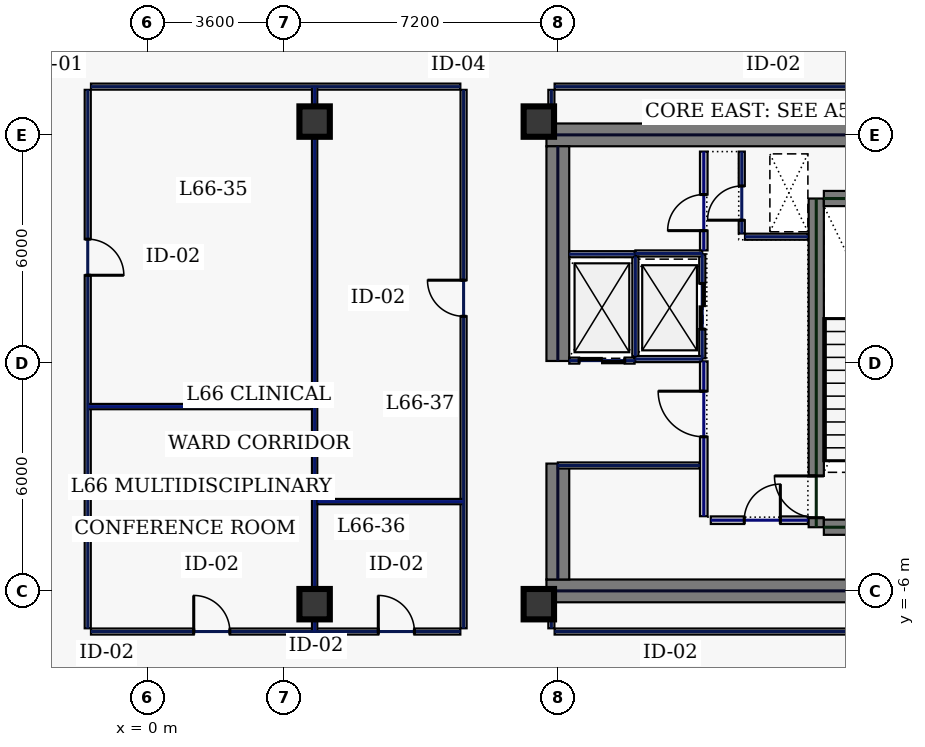
"""IFC4 building model, lengths in metres.
Left out: names, types, materials, properties, quantities, classifications, styles, units other than length and angle.
Written with IfcOpenShell. Run it as: python <this file> out.ifc"""

import sys

from ifc_helpers import new_model, si_unit, direction, frame, frame_2d, origin, origin_2d, place, context, subcontext, project, spatial, rectangle, hollow_rectangle, extrude, element, fill, save


model = new_model("IFC4")
c1 = context("Model", 3, precision=1e-05, world=origin(), true_north=direction((0.0, 1.0)))
c2 = subcontext(c1, "Body", "Model", "MODEL_VIEW")
j1 = project(units=[si_unit("LENGTHUNIT", "METRE"), si_unit("PLANEANGLEUNIT", "RADIAN")], contexts=[c1])
p1 = place(None, origin())
s1 = spatial("IfcSite", under=j1, at=p1, CompositionType="ELEMENT")
p2 = place(p1, origin())
s2 = spatial("IfcBuilding", under=s1, at=p2, CompositionType="ELEMENT")
p3 = place(p2, frame((0.0, 0.0, 285.0)))
s3 = spatial("IfcBuildingStorey", under=s2, at=p3, CompositionType="ELEMENT", Elevation=285.0)
for number, where, z_axis, x_axis in (
    (1, (10.5, 6.0, 0.0), (0.0, 0.0, 1.0), (1.0, 0.0, 0.0)),
    (2, (10.5, -6.0, 0.0), (0.0, 0.0, 1.0), (1.0, 0.0, 0.0)),
):
    element("IfcWall", number, at=place(p3, frame(where, z_axis=z_axis, x_axis=x_axis)), inside=s3, PredefinedType="SHEAR", context=c2, shape_type="SweptSolid", body=[
        extrude(rectangle(XDim=11.5, YDim=0.6, at=frame_2d((5.75, 0.0))), origin(), (0.0, 0.0, 1.0), 3.74),
    ])
p4 = place(p3, frame((10.8, -5.7, 0.0), z_axis=(0.0, 0.0, 1.0), x_axis=(0.0, 1.0, 0.0)))
e3 = element("IfcWall", 3, at=p4, inside=s3, PredefinedType="SHEAR", context=c2, shape_type="SweptSolid", body=[
    extrude(rectangle(XDim=3.05, YDim=0.6, at=frame_2d((1.525, 0.0))), origin(), (0.0, 0.0, 1.0), 3.74),
])
p5 = place(p3, frame((10.8, 0.05, 0.0), z_axis=(0.0, 0.0, 1.0), x_axis=(0.0, 1.0, 0.0)))
e4 = element("IfcWall", 4, at=p5, inside=s3, PredefinedType="SHEAR", context=c2, shape_type="SweptSolid", body=[
    extrude(rectangle(XDim=5.65, YDim=0.6, at=frame_2d((2.825, 0.0))), origin(), (0.0, 0.0, 1.0), 3.74),
])
p6 = place(p3, frame((17.6, -4.325, 0.0), z_axis=(0.0, 0.0, 1.0), x_axis=(0.0, 1.0, 0.0)))
e5 = element("IfcWall", 5, at=p6, inside=s3, PredefinedType="SHEAR", context=c2, shape_type="SweptSolid", body=[
    extrude(rectangle(XDim=8.65, YDim=0.4, at=frame_2d((4.325, 0.0))), origin(), (0.0, 0.0, 1.0), 3.74),
])
p7 = place(p6, frame((0.25, 0.0, 0.0)))
e6 = element("IfcOpeningElement", 6, at=p7, cuts=e5, PredefinedType="OPENING", context=c2, shape_type="SweptSolid", body=[
    extrude(rectangle(XDim=1.1, YDim=2.2, at=frame_2d((0.55, 1.1))), frame((0.0, 0.21, 0.0), z_axis=(0.0, -1.0, 0.0), x_axis=(1.0, 0.0, 0.0)), (0.0, 0.0, 1.0), 0.42),
])
for number, where, z_axis, x_axis in (
    (7, (17.8, -4.325, 0.0), (0.0, 0.0, 1.0), (1.0, 0.0, 0.0)),
    (8, (17.8, 4.325, 0.0), (0.0, 0.0, 1.0), (1.0, 0.0, 0.0)),
):
    element("IfcWall", number, at=place(p3, frame(where, z_axis=z_axis, x_axis=x_axis)), inside=s3, PredefinedType="SHEAR", context=c2, shape_type="SweptSolid", body=[
        extrude(rectangle(XDim=3.4, YDim=0.4, at=frame_2d((1.7, 0.0))), origin(), (0.0, 0.0, 1.0), 3.74),
    ])
for number, where, z_axis, x_axis in (
    (9, (10.3, -6.35, 0.0), (0.0, 0.0, 1.0), (1.0, 0.0, 0.0)),
    (10, (10.3, 6.35, 0.0), (0.0, 0.0, 1.0), (1.0, 0.0, 0.0)),
    (11, (4.4, -6.35, 0.0), (0.0, 0.0, 1.0), (1.0, 0.0, 0.0)),
    (12, (4.4, 6.35, 0.0), (0.0, 0.0, 1.0), (1.0, 0.0, 0.0)),
):
    element("IfcColumn", number, at=place(p3, frame(where, z_axis=z_axis, x_axis=x_axis)), inside=s3, PredefinedType="COLUMN", context=c2, shape_type="SweptSolid", body=[
        extrude(hollow_rectangle(XDim=0.8, YDim=0.8, WallThickness=0.036, at=origin_2d()), origin(), (0.0, 0.0, 1.0), 3.74),
    ])
p8 = place(p3, frame((14.6, 0.12, 0.0), z_axis=(0.0, 0.0, 1.0), x_axis=(0.0, 1.0, 0.0)))
e13 = element("IfcWall", 13, at=p8, inside=s3, PredefinedType="PARTITIONING", context=c2, shape_type="SweptSolid", body=[
    extrude(rectangle(XDim=2.74, YDim=0.16, at=frame_2d((1.37, 0.0))), origin(), (0.0, 0.0, 1.0), 3.74),
])
p9 = place(p8, frame((0.77, 0.0, 0.0)))
e14 = element("IfcOpeningElement", 14, at=p9, cuts=e13, PredefinedType="OPENING", context=c2, shape_type="SweptSolid", body=[
    extrude(rectangle(XDim=1.2, YDim=2.2, at=frame_2d((0.6, 1.1))), frame((0.0, 0.09, 0.0), z_axis=(0.0, -1.0, 0.0), x_axis=(1.0, 0.0, 0.0)), (0.0, 0.0, 1.0), 0.18),
])
for number, where, z_axis, x_axis in (
    (15, (12.84, 0.1, 0.0), (0.0, 0.0, 1.0), (1.0, 0.0, 0.0)),
    (16, (12.84, 2.88, 0.0), (0.0, 0.0, 1.0), (1.0, 0.0, 0.0)),
):
    element("IfcWall", number, at=place(p3, frame(where, z_axis=z_axis, x_axis=x_axis)), inside=s3, PredefinedType="PARTITIONING", context=c2, shape_type="SweptSolid", body=[
        extrude(rectangle(XDim=1.76, YDim=0.16, at=frame_2d((0.88, 0.0))), origin(), (0.0, 0.0, 1.0), 3.74),
    ])
p10 = place(p3, frame((12.84, 0.18, 0.0), z_axis=(0.0, 0.0, 1.0), x_axis=(0.0, 1.0, 0.0)))
e17 = element("IfcWall", 17, at=p10, inside=s3, PredefinedType="PARTITIONING", context=c2, shape_type="SweptSolid", body=[
    extrude(rectangle(XDim=2.62, YDim=0.16, at=frame_2d((1.31, 0.0))), origin(), (0.0, 0.0, 1.0), 3.74),
])
p11 = place(p3, frame((11.1, 0.06, 0.0), z_axis=(0.0, 0.0, 1.0), x_axis=(1.0, 0.0, 0.0)))
e18 = element("IfcWall", 18, at=p11, inside=s3, PredefinedType="PARTITIONING", context=c2, shape_type="SweptSolid", body=[
    extrude(rectangle(XDim=1.72, YDim=0.16, at=frame_2d((0.86, 0.0))), origin(), (0.0, 0.0, 1.0), 3.74),
])
p12 = place(p11, frame((0.26, 0.0, 0.0)))
e19 = element("IfcOpeningElement", 19, at=p12, cuts=e18, PredefinedType="OPENING", context=c2, shape_type="SweptSolid", body=[
    extrude(rectangle(XDim=1.2, YDim=2.2, at=frame_2d((0.6, 1.1))), frame((0.0, 0.09, 0.0), z_axis=(0.0, -1.0, 0.0), x_axis=(1.0, 0.0, 0.0)), (0.0, 0.0, 1.0), 0.18),
])
p13 = place(p3, frame((11.1, 2.86, 0.0), z_axis=(0.0, 0.0, 1.0), x_axis=(1.0, 0.0, 0.0)))
e20 = element("IfcWall", 20, at=p13, inside=s3, PredefinedType="PARTITIONING", context=c2, shape_type="SweptSolid", body=[
    extrude(rectangle(XDim=1.72, YDim=0.16, at=frame_2d((0.86, 0.0))), origin(), (0.0, 0.0, 1.0), 3.74),
])
p14 = place(p3, frame((15.64, 3.405, 0.0), z_axis=(0.0, 0.0, 1.0), x_axis=(0.0, 1.0, 0.0)))
e21 = element("IfcWall", 21, at=p14, inside=s3, PredefinedType="PARTITIONING", context=c2, shape_type="SweptSolid", body=[
    extrude(rectangle(XDim=2.155, YDim=0.16, at=frame_2d((1.078, 0.0))), origin(), (0.0, 0.0, 1.0), 3.74),
])
p15 = place(p14, frame((0.35, 0.0, 0.0)))
e22 = element("IfcOpeningElement", 22, at=p15, cuts=e21, PredefinedType="OPENING", context=c2, shape_type="SweptSolid", body=[
    extrude(rectangle(XDim=0.9, YDim=2.2, at=frame_2d((0.45, 1.1))), frame((0.0, 0.09, 0.0), z_axis=(0.0, -1.0, 0.0), x_axis=(1.0, 0.0, 0.0)), (0.0, 0.0, 1.0), 0.18),
])
p16 = place(p3, frame((15.725, 3.32, 0.0), z_axis=(0.0, 0.0, 1.0), x_axis=(1.0, 0.0, 0.0)))
e23 = element("IfcWall", 23, at=p16, inside=s3, PredefinedType="PARTITIONING", context=c2, shape_type="SweptSolid", body=[
    extrude(rectangle(XDim=1.655, YDim=0.16, at=frame_2d((0.827, 0.0))), origin(), (0.0, 0.0, 1.0), 3.74),
])
p17 = place(p3, frame((14.825, -4.14, 0.0), z_axis=(0.0, 0.0, 1.0), x_axis=(1.0, 0.0, 0.0)))
e24 = element("IfcWall", 24, at=p17, inside=s3, PredefinedType="SOLIDWALL", context=c2, shape_type="SweptSolid", body=[
    extrude(rectangle(XDim=2.555, YDim=0.2, at=frame_2d((1.277, 0.0))), origin(), (0.0, 0.0, 1.0), 3.74),
])
p18 = place(p17, frame((0.88, 0.0, 0.0)))
e25 = element("IfcOpeningElement", 25, at=p18, cuts=e24, PredefinedType="OPENING", context=c2, shape_type="SweptSolid", body=[
    extrude(rectangle(XDim=0.95, YDim=2.2, at=frame_2d((0.475, 1.1))), frame((0.0, 0.11, 0.0), z_axis=(0.0, -1.0, 0.0), x_axis=(1.0, 0.0, 0.0)), (0.0, 0.0, 1.0), 0.22),
])
p19 = place(p3, frame((10.8, -2.7, 0.0), z_axis=(0.0, 0.0, 1.0), x_axis=(1.0, 0.0, 0.0)))
e26 = element("IfcWall", 26, at=p19, inside=s3, PredefinedType="PARTITIONING", context=c2, shape_type="SweptSolid", body=[
    extrude(rectangle(XDim=3.735, YDim=0.16, at=frame_2d((1.867, 0.0))), origin(), (0.0, 0.0, 1.0), 3.74),
])
p20 = place(p3, frame((14.64, 2.96, 0.0), z_axis=(0.0, 0.0, 1.0), x_axis=(0.0, 1.0, 0.0)))
e27 = element("IfcWall", 27, at=p20, inside=s3, PredefinedType="SOLIDWALL", context=c2, shape_type="SweptSolid", body=[
    extrude(rectangle(XDim=2.6, YDim=0.2, at=frame_2d((1.3, 0.0))), origin(), (0.0, 0.0, 1.0), 3.74),
])
p21 = place(p20, frame((0.52, 0.0, 0.0)))
e28 = element("IfcOpeningElement", 28, at=p21, cuts=e27, PredefinedType="OPENING", context=c2, shape_type="SweptSolid", body=[
    extrude(rectangle(XDim=0.95, YDim=2.2, at=frame_2d((0.475, 1.1))), frame((0.0, 0.11, 0.0), z_axis=(0.0, -1.0, 0.0), x_axis=(1.0, 0.0, 0.0)), (0.0, 0.0, 1.0), 0.22),
])
p22 = place(p3, frame((14.64, -4.035, 0.0), z_axis=(0.0, 0.0, 1.0), x_axis=(0.0, 1.0, 0.0)))
e29 = element("IfcWall", 29, at=p22, inside=s3, PredefinedType="SOLIDWALL", context=c2, shape_type="SweptSolid", body=[
    extrude(rectangle(XDim=4.075, YDim=0.2, at=frame_2d((2.038, 0.0))), origin(), (0.0, 0.0, 1.0), 3.74),
])
p23 = place(p22, frame((2.09, 0.0, 0.0)))
e30 = element("IfcOpeningElement", 30, at=p23, cuts=e29, PredefinedType="OPENING", context=c2, shape_type="SweptSolid", body=[
    extrude(rectangle(XDim=1.2, YDim=2.2, at=frame_2d((0.6, 1.1))), frame((0.0, 0.11, 0.0), z_axis=(0.0, -1.0, 0.0), x_axis=(1.0, 0.0, 0.0)), (0.0, 0.0, 1.0), 0.22),
])
p24 = place(p3, frame((21.915, 7.27, 0.0), z_axis=(0.0, 0.0, 1.0), x_axis=(-1.0, 0.0, 0.0)))
e31 = element("IfcWall", 31, at=p24, inside=s3, PredefinedType="PARTITIONING", context=c2, shape_type="SweptSolid", body=[
    extrude(rectangle(XDim=11.2, YDim=0.16, at=frame_2d((5.6, 0.0))), origin(), (0.0, 0.0, 1.0), 3.74),
])
p25 = place(p3, frame((10.63, 7.185, 0.0), z_axis=(0.0, 0.0, 1.0), x_axis=(0.0, -1.0, 0.0)))
e32 = element("IfcWall", 32, at=p25, inside=s3, PredefinedType="PARTITIONING", context=c2, shape_type="SweptSolid", body=[
    extrude(rectangle(XDim=0.765, YDim=0.16, at=frame_2d((0.383, 0.0))), origin(), (0.0, 0.0, 1.0), 3.74),
])
p26 = place(p3, frame((10.63, -6.42, 0.0), z_axis=(0.0, 0.0, 1.0), x_axis=(0.0, -1.0, 0.0)))
e33 = element("IfcWall", 33, at=p26, inside=s3, PredefinedType="PARTITIONING", context=c2, shape_type="SweptSolid", body=[
    extrude(rectangle(XDim=0.565, YDim=0.16, at=frame_2d((0.283, 0.0))), origin(), (0.0, 0.0, 1.0), 3.74),
])
p27 = place(p3, frame((10.715, -7.07, 0.0), z_axis=(0.0, 0.0, 1.0), x_axis=(1.0, 0.0, 0.0)))
e34 = element("IfcWall", 34, at=p27, inside=s3, PredefinedType="PARTITIONING", context=c2, shape_type="SweptSolid", body=[
    extrude(rectangle(XDim=11.2, YDim=0.16, at=frame_2d((5.6, 0.0))), origin(), (0.0, 0.0, 1.0), 3.74),
])
p28 = place(p3, frame((8.235, 7.27, 0.0), z_axis=(0.0, 0.0, 1.0), x_axis=(-1.0, 0.0, 0.0)))
e35 = element("IfcWall", 35, at=p28, inside=s3, PredefinedType="PARTITIONING", context=c2, shape_type="SweptSolid", body=[
    extrude(rectangle(XDim=9.72, YDim=0.16, at=frame_2d((4.86, 0.0))), origin(), (0.0, 0.0, 1.0), 3.74),
])
p29 = place(p3, frame((-1.57, 7.185, 0.0), z_axis=(0.0, 0.0, 1.0), x_axis=(0.0, -1.0, 0.0)))
e36 = element("IfcWall", 36, at=p29, inside=s3, PredefinedType="PARTITIONING", context=c2, shape_type="SweptSolid", body=[
    extrude(rectangle(XDim=14.17, YDim=0.16, at=frame_2d((7.085, 0.0))), origin(), (0.0, 0.0, 1.0), 3.74),
])
p30 = place(p29, frame((3.929, 0.0, 0.0)))
e37 = element("IfcOpeningElement", 37, at=p30, cuts=e36, PredefinedType="OPENING", context=c2, shape_type="SweptSolid", body=[
    extrude(rectangle(XDim=0.95, YDim=2.2, at=frame_2d((0.475, 1.1))), frame((0.0, 0.09, 0.0), z_axis=(0.0, -1.0, 0.0), x_axis=(1.0, 0.0, 0.0)), (0.0, 0.0, 1.0), 0.18),
])
p31 = place(p3, frame((-1.485, -7.07, 0.0), z_axis=(0.0, 0.0, 1.0), x_axis=(1.0, 0.0, 0.0)))
e38 = element("IfcWall", 38, at=p31, inside=s3, PredefinedType="PARTITIONING", context=c2, shape_type="SweptSolid", body=[
    extrude(rectangle(XDim=9.72, YDim=0.16, at=frame_2d((4.86, 0.0))), origin(), (0.0, 0.0, 1.0), 3.74),
])
p32 = place(p31, frame((2.704, 0.0, 0.0)))
e39 = element("IfcOpeningElement", 39, at=p32, cuts=e38, PredefinedType="OPENING", context=c2, shape_type="SweptSolid", body=[
    extrude(rectangle(XDim=0.95, YDim=2.2, at=frame_2d((0.475, 1.1))), frame((0.0, 0.09, 0.0), z_axis=(0.0, -1.0, 0.0), x_axis=(1.0, 0.0, 0.0)), (0.0, 0.0, 1.0), 0.18),
])
p33 = place(p31, frame((7.561, 0.0, 0.0)))
e40 = element("IfcOpeningElement", 40, at=p33, cuts=e38, PredefinedType="OPENING", context=c2, shape_type="SweptSolid", body=[
    extrude(rectangle(XDim=0.95, YDim=2.2, at=frame_2d((0.475, 1.1))), frame((0.0, 0.09, 0.0), z_axis=(0.0, -1.0, 0.0), x_axis=(1.0, 0.0, 0.0)), (0.0, 0.0, 1.0), 0.18),
])
p34 = place(p3, frame((8.32, -6.985, 0.0), z_axis=(0.0, 0.0, 1.0), x_axis=(0.0, 1.0, 0.0)))
e41 = element("IfcWall", 41, at=p34, inside=s3, PredefinedType="PARTITIONING", context=c2, shape_type="SweptSolid", body=[
    extrude(rectangle(XDim=14.17, YDim=0.16, at=frame_2d((7.085, 0.0))), origin(), (0.0, 0.0, 1.0), 3.74),
])
p35 = place(p34, frame((8.211, 0.0, 0.0)))
e42 = element("IfcOpeningElement", 42, at=p35, cuts=e41, PredefinedType="OPENING", context=c2, shape_type="SweptSolid", body=[
    extrude(rectangle(XDim=0.95, YDim=2.2, at=frame_2d((0.475, 1.1))), frame((0.0, 0.09, 0.0), z_axis=(0.0, -1.0, 0.0), x_axis=(1.0, 0.0, 0.0)), (0.0, 0.0, 1.0), 0.18),
])
p36 = place(p3, frame((4.4, -7.065, 0.0), z_axis=(0.0, 0.0, 1.0), x_axis=(0.0, 1.0, 0.0)))
e43 = element("IfcWall", 43, at=p36, inside=s3, PredefinedType="PARTITIONING", context=c2, shape_type="SweptSolid", body=[
    extrude(rectangle(XDim=14.33, YDim=0.14, at=frame_2d((7.165, 0.0))), origin(), (0.0, 0.0, 1.0), 3.035),
])
p37 = place(p3, frame((-1.565, -1.15, 0.0), z_axis=(0.0, 0.0, 1.0), x_axis=(1.0, 0.0, 0.0)))
e44 = element("IfcWall", 44, at=p37, inside=s3, PredefinedType="PARTITIONING", context=c2, shape_type="SweptSolid", body=[
    extrude(rectangle(XDim=5.89, YDim=0.14, at=frame_2d((2.945, 0.0))), origin(), (0.0, 0.0, 1.0), 3.74),
])
p38 = place(p3, frame((4.475, -3.65, 0.0), z_axis=(0.0, 0.0, 1.0), x_axis=(1.0, 0.0, 0.0)))
e45 = element("IfcWall", 45, at=p38, inside=s3, PredefinedType="PARTITIONING", context=c2, shape_type="SweptSolid", body=[
    extrude(rectangle(XDim=3.84, YDim=0.14, at=frame_2d((1.92, 0.0))), origin(), (0.0, 0.0, 1.0), 3.74),
])
p39 = place(p7, origin())
e46 = element("IfcDoor", 46, at=p39, inside=s3, OperationType="SINGLE_SWING_RIGHT", PredefinedType="DOOR", context=c2, shape_type="SweptSolid", body=[
    extrude(rectangle(XDim=1.1, YDim=2.2, at=frame_2d((0.55, 1.1))), frame((0.0, 0.025, 0.0), z_axis=(0.0, -1.0, 0.0), x_axis=(1.0, 0.0, 0.0)), (0.0, 0.0, 1.0), 0.05),
])
fill(e6, e46)
p40 = place(p9, origin())
e47 = element("IfcDoor", 47, at=p40, inside=s3, OperationType="SLIDING_TO_LEFT", PredefinedType="DOOR", context=c2, shape_type="SweptSolid", body=[
    extrude(rectangle(XDim=1.2, YDim=2.2, at=frame_2d((0.6, 1.1))), frame((0.0, 0.025, 0.0), z_axis=(0.0, -1.0, 0.0), x_axis=(1.0, 0.0, 0.0)), (0.0, 0.0, 1.0), 0.05),
])
fill(e14, e47)
p41 = place(p12, origin())
e48 = element("IfcDoor", 48, at=p41, inside=s3, OperationType="SLIDING_TO_LEFT", PredefinedType="DOOR", context=c2, shape_type="SweptSolid", body=[
    extrude(rectangle(XDim=1.2, YDim=2.2, at=frame_2d((0.6, 1.1))), frame((0.0, 0.025, 0.0), z_axis=(0.0, -1.0, 0.0), x_axis=(1.0, 0.0, 0.0)), (0.0, 0.0, 1.0), 0.05),
])
fill(e19, e48)
p42 = place(p15, origin())
e49 = element("IfcDoor", 49, at=p42, inside=s3, OperationType="SINGLE_SWING_LEFT", PredefinedType="DOOR", context=c2, shape_type="SweptSolid", body=[
    extrude(rectangle(XDim=0.9, YDim=2.2, at=frame_2d((0.45, 1.1))), frame((0.0, 0.025, 0.0), z_axis=(0.0, -1.0, 0.0), x_axis=(1.0, 0.0, 0.0)), (0.0, 0.0, 1.0), 0.05),
])
fill(e22, e49)
p43 = place(p18, origin())
e50 = element("IfcDoor", 50, at=p43, inside=s3, OperationType="SINGLE_SWING_RIGHT", PredefinedType="DOOR", context=c2, shape_type="SweptSolid", body=[
    extrude(rectangle(XDim=0.95, YDim=2.2, at=frame_2d((0.475, 1.1))), frame((0.0, 0.025, 0.0), z_axis=(0.0, -1.0, 0.0), x_axis=(1.0, 0.0, 0.0)), (0.0, 0.0, 1.0), 0.05),
])
fill(e25, e50)
p44 = place(p21, origin())
e51 = element("IfcDoor", 51, at=p44, inside=s3, OperationType="SINGLE_SWING_LEFT", PredefinedType="DOOR", context=c2, shape_type="SweptSolid", body=[
    extrude(rectangle(XDim=0.95, YDim=2.2, at=frame_2d((0.475, 1.1))), frame((0.0, 0.025, 0.0), z_axis=(0.0, -1.0, 0.0), x_axis=(1.0, 0.0, 0.0)), (0.0, 0.0, 1.0), 0.05),
])
fill(e28, e51)
p45 = place(p23, origin())
e52 = element("IfcDoor", 52, at=p45, inside=s3, OperationType="SINGLE_SWING_RIGHT", PredefinedType="DOOR", context=c2, shape_type="SweptSolid", body=[
    extrude(rectangle(XDim=1.2, YDim=2.2, at=frame_2d((0.6, 1.1))), frame((0.0, 0.025, 0.0), z_axis=(0.0, -1.0, 0.0), x_axis=(1.0, 0.0, 0.0)), (0.0, 0.0, 1.0), 0.05),
])
fill(e30, e52)
p46 = place(p32, origin())
e53 = element("IfcDoor", 53, at=p46, inside=s3, OperationType="SINGLE_SWING_LEFT", PredefinedType="DOOR", context=c2, shape_type="SweptSolid", body=[
    extrude(rectangle(XDim=0.95, YDim=2.2, at=frame_2d((0.475, 1.1))), frame((0.0, 0.025, 0.0), z_axis=(0.0, -1.0, 0.0), x_axis=(1.0, 0.0, 0.0)), (0.0, 0.0, 1.0), 0.05),
])
fill(e39, e53)
p47 = place(p30, origin())
e54 = element("IfcDoor", 54, at=p47, inside=s3, OperationType="SINGLE_SWING_RIGHT", PredefinedType="DOOR", context=c2, shape_type="SweptSolid", body=[
    extrude(rectangle(XDim=0.95, YDim=2.2, at=frame_2d((0.475, 1.1))), frame((0.0, 0.025, 0.0), z_axis=(0.0, -1.0, 0.0), x_axis=(1.0, 0.0, 0.0)), (0.0, 0.0, 1.0), 0.05),
])
fill(e37, e54)
p48 = place(p33, origin())
e55 = element("IfcDoor", 55, at=p48, inside=s3, OperationType="SINGLE_SWING_LEFT", PredefinedType="DOOR", context=c2, shape_type="SweptSolid", body=[
    extrude(rectangle(XDim=0.95, YDim=2.2, at=frame_2d((0.475, 1.1))), frame((0.0, 0.025, 0.0), z_axis=(0.0, -1.0, 0.0), x_axis=(1.0, 0.0, 0.0)), (0.0, 0.0, 1.0), 0.05),
])
fill(e40, e55)
p49 = place(p35, origin())
e56 = element("IfcDoor", 56, at=p49, inside=s3, OperationType="SINGLE_SWING_RIGHT", PredefinedType="DOOR", context=c2, shape_type="SweptSolid", body=[
    extrude(rectangle(XDim=0.95, YDim=2.2, at=frame_2d((0.475, 1.1))), frame((0.0, 0.025, 0.0), z_axis=(0.0, -1.0, 0.0), x_axis=(1.0, 0.0, 0.0)), (0.0, 0.0, 1.0), 0.05),
])
fill(e42, e56)
save(model, sys.argv[1])
